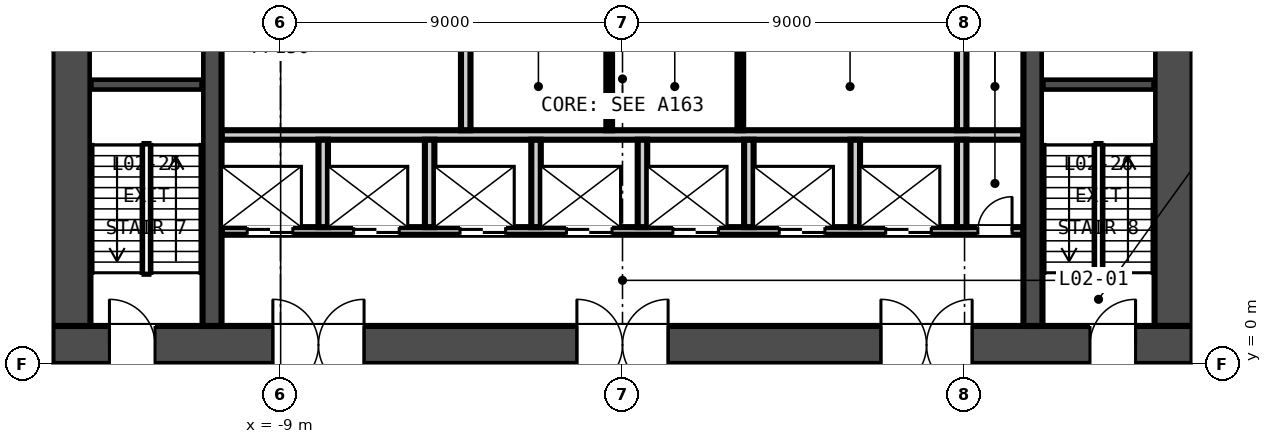
"""IFC4 building model, lengths in metres.
Left out: names, types, materials, properties, quantities, classifications, styles, units other than length and angle.
Written with IfcOpenShell. Run it as: python <this file> out.ifc"""

import sys

from ifc_helpers import new_model, si_unit, direction, frame, frame_2d, origin, place, context, subcontext, project, spatial, rectangle, extrude, element, fill, save


model = new_model("IFC4")
c1 = context("Model", 3, precision=1e-05, world=origin(), true_north=direction((0.0, 1.0)))
c2 = subcontext(c1, "Body", "Model", "MODEL_VIEW")
j1 = project(units=[si_unit("LENGTHUNIT", "METRE"), si_unit("PLANEANGLEUNIT", "RADIAN")], contexts=[c1])
p1 = place(None, origin())
s1 = spatial("IfcSite", under=j1, at=p1, CompositionType="ELEMENT")
p2 = place(p1, origin())
s2 = spatial("IfcBuilding", under=s1, at=p2, CompositionType="ELEMENT")
p3 = place(p2, frame((0.0, 0.0, 18.0)))
s3 = spatial("IfcBuildingStorey", under=s2, at=p3, CompositionType="ELEMENT", Elevation=18.0)
p4 = place(p3, frame((-15.0, 0.5, -0.4), z_axis=(0.0, 0.0, 1.0), x_axis=(1.0, 0.0, 0.0)))
e1 = element("IfcWall", 1, at=p4, inside=s3, PredefinedType="SOLIDWALL", context=c2, shape_type="SweptSolid", body=[
    extrude(rectangle(XDim=30.0, YDim=1.0, at=frame_2d((15.0, 0.0))), origin(), (0.0, 0.0, 1.0), 4.6),
])
p5 = place(p4, frame((5.8, 0.0, 0.4)))
e2 = element("IfcOpeningElement", 2, at=p5, cuts=e1, PredefinedType="OPENING", context=c2, shape_type="SweptSolid", body=[
    extrude(rectangle(XDim=2.4, YDim=2.4, at=frame_2d((1.2, 1.2))), frame((0.0, 0.51, 0.0), z_axis=(0.0, -1.0, 0.0), x_axis=(1.0, 0.0, 0.0)), (0.0, 0.0, 1.0), 1.02),
])
p6 = place(p4, frame((13.8, 0.0, 0.4)))
e3 = element("IfcOpeningElement", 3, at=p6, cuts=e1, PredefinedType="OPENING", context=c2, shape_type="SweptSolid", body=[
    extrude(rectangle(XDim=2.4, YDim=2.4, at=frame_2d((1.2, 1.2))), frame((0.0, 0.51, 0.0), z_axis=(0.0, -1.0, 0.0), x_axis=(1.0, 0.0, 0.0)), (0.0, 0.0, 1.0), 1.02),
])
p7 = place(p4, frame((21.8, 0.0, 0.4)))
e4 = element("IfcOpeningElement", 4, at=p7, cuts=e1, PredefinedType="OPENING", context=c2, shape_type="SweptSolid", body=[
    extrude(rectangle(XDim=2.4, YDim=2.4, at=frame_2d((1.2, 1.2))), frame((0.0, 0.51, 0.0), z_axis=(0.0, -1.0, 0.0), x_axis=(1.0, 0.0, 0.0)), (0.0, 0.0, 1.0), 1.02),
])
p8 = place(p4, frame((1.5, 0.0, 0.4)))
e5 = element("IfcOpeningElement", 5, at=p8, cuts=e1, PredefinedType="OPENING", context=c2, shape_type="SweptSolid", body=[
    extrude(rectangle(XDim=1.2, YDim=2.1, at=frame_2d((0.6, 1.05))), frame((0.0, 0.51, 0.0), z_axis=(0.0, -1.0, 0.0), x_axis=(1.0, 0.0, 0.0)), (0.0, 0.0, 1.0), 1.02),
])
p9 = place(p4, frame((27.3, 0.0, 0.4)))
e6 = element("IfcOpeningElement", 6, at=p9, cuts=e1, PredefinedType="OPENING", context=c2, shape_type="SweptSolid", body=[
    extrude(rectangle(XDim=1.2, YDim=2.1, at=frame_2d((0.6, 1.05))), frame((0.0, 0.51, 0.0), z_axis=(0.0, -1.0, 0.0), x_axis=(1.0, 0.0, 0.0)), (0.0, 0.0, 1.0), 1.02),
])
for number, where, z_axis, x_axis in (
    (7, (-14.5, 1.0, -0.4), (0.0, 0.0, 1.0), (0.0, 1.0, 0.0)),
    (8, (14.5, 1.0, -0.4), (0.0, 0.0, 1.0), (0.0, 1.0, 0.0)),
):
    element("IfcWall", number, at=place(p3, frame(where, z_axis=z_axis, x_axis=x_axis)), inside=s3, PredefinedType="SOLIDWALL", context=c2, shape_type="SweptSolid", body=[
        extrude(rectangle(XDim=13.0, YDim=1.0, at=frame_2d((6.5, 0.0))), origin(), (0.0, 0.0, 1.0), 4.6),
    ])
for number, where, z_axis, x_axis in (
    (9, (-10.8, 1.0, -0.4), (0.0, 0.0, 1.0), (0.0, 1.0, 0.0)),
    (10, (10.8, 1.0, -0.4), (0.0, 0.0, 1.0), (0.0, 1.0, 0.0)),
):
    element("IfcWall", number, at=place(p3, frame(where, z_axis=z_axis, x_axis=x_axis)), inside=s3, PredefinedType="SOLIDWALL", context=c2, shape_type="SweptSolid", body=[
        extrude(rectangle(XDim=13.0, YDim=0.5, at=frame_2d((6.5, 0.0))), origin(), (0.0, 0.0, 1.0), 4.6),
    ])
p10 = place(p3, frame((-10.55, 3.5, 0.0), z_axis=(0.0, 0.0, 1.0), x_axis=(1.0, 0.0, 0.0)))
e11 = element("IfcWall", 11, at=p10, inside=s3, PredefinedType="PARTITIONING", context=c2, shape_type="SweptSolid", body=[
    extrude(rectangle(XDim=21.1, YDim=0.2, at=frame_2d((10.55, 0.0))), origin(), (0.0, 0.0, 1.0), 4.2),
])
p11 = place(p10, frame((0.675, 0.0, 0.0)))
e12 = element("IfcOpeningElement", 12, at=p11, cuts=e11, PredefinedType="OPENING", context=c2, shape_type="SweptSolid", body=[
    extrude(rectangle(XDim=1.2, YDim=2.1, at=frame_2d((0.6, 1.05))), frame((0.0, 0.11, 0.0), z_axis=(0.0, -1.0, 0.0), x_axis=(1.0, 0.0, 0.0)), (0.0, 0.0, 1.0), 0.22),
])
p12 = place(p10, frame((3.475, 0.0, 0.0)))
e13 = element("IfcOpeningElement", 13, at=p12, cuts=e11, PredefinedType="OPENING", context=c2, shape_type="SweptSolid", body=[
    extrude(rectangle(XDim=1.2, YDim=2.1, at=frame_2d((0.6, 1.05))), frame((0.0, 0.11, 0.0), z_axis=(0.0, -1.0, 0.0), x_axis=(1.0, 0.0, 0.0)), (0.0, 0.0, 1.0), 0.22),
])
p13 = place(p10, frame((6.275, 0.0, 0.0)))
e14 = element("IfcOpeningElement", 14, at=p13, cuts=e11, PredefinedType="OPENING", context=c2, shape_type="SweptSolid", body=[
    extrude(rectangle(XDim=1.2, YDim=2.1, at=frame_2d((0.6, 1.05))), frame((0.0, 0.11, 0.0), z_axis=(0.0, -1.0, 0.0), x_axis=(1.0, 0.0, 0.0)), (0.0, 0.0, 1.0), 0.22),
])
p14 = place(p10, frame((9.075, 0.0, 0.0)))
e15 = element("IfcOpeningElement", 15, at=p14, cuts=e11, PredefinedType="OPENING", context=c2, shape_type="SweptSolid", body=[
    extrude(rectangle(XDim=1.2, YDim=2.1, at=frame_2d((0.6, 1.05))), frame((0.0, 0.11, 0.0), z_axis=(0.0, -1.0, 0.0), x_axis=(1.0, 0.0, 0.0)), (0.0, 0.0, 1.0), 0.22),
])
p15 = place(p10, frame((11.875, 0.0, 0.0)))
e16 = element("IfcOpeningElement", 16, at=p15, cuts=e11, PredefinedType="OPENING", context=c2, shape_type="SweptSolid", body=[
    extrude(rectangle(XDim=1.2, YDim=2.1, at=frame_2d((0.6, 1.05))), frame((0.0, 0.11, 0.0), z_axis=(0.0, -1.0, 0.0), x_axis=(1.0, 0.0, 0.0)), (0.0, 0.0, 1.0), 0.22),
])
p16 = place(p10, frame((14.675, 0.0, 0.0)))
e17 = element("IfcOpeningElement", 17, at=p16, cuts=e11, PredefinedType="OPENING", context=c2, shape_type="SweptSolid", body=[
    extrude(rectangle(XDim=1.2, YDim=2.1, at=frame_2d((0.6, 1.05))), frame((0.0, 0.11, 0.0), z_axis=(0.0, -1.0, 0.0), x_axis=(1.0, 0.0, 0.0)), (0.0, 0.0, 1.0), 0.22),
])
p17 = place(p10, frame((17.475, 0.0, 0.0)))
e18 = element("IfcOpeningElement", 18, at=p17, cuts=e11, PredefinedType="OPENING", context=c2, shape_type="SweptSolid", body=[
    extrude(rectangle(XDim=1.2, YDim=2.1, at=frame_2d((0.6, 1.05))), frame((0.0, 0.11, 0.0), z_axis=(0.0, -1.0, 0.0), x_axis=(1.0, 0.0, 0.0)), (0.0, 0.0, 1.0), 0.22),
])
p18 = place(p10, frame((19.9, 0.0, 0.0)))
e19 = element("IfcOpeningElement", 19, at=p18, cuts=e11, PredefinedType="OPENING", context=c2, shape_type="SweptSolid", body=[
    extrude(rectangle(XDim=0.9, YDim=2.1, at=frame_2d((0.45, 1.05))), frame((0.0, 0.11, 0.0), z_axis=(0.0, -1.0, 0.0), x_axis=(1.0, 0.0, 0.0)), (0.0, 0.0, 1.0), 0.22),
])
p19 = place(p3, frame((-10.55, 6.025, 0.0), z_axis=(0.0, 0.0, 1.0), x_axis=(1.0, 0.0, 0.0)))
e20 = element("IfcWall", 20, at=p19, inside=s3, PredefinedType="PARTITIONING", context=c2, shape_type="SweptSolid", body=[
    extrude(rectangle(XDim=21.1, YDim=0.25, at=frame_2d((10.55, 0.0))), origin(), (0.0, 0.0, 1.0), 4.2),
])
p20 = place(p3, frame((-4.125, 6.15, 0.0), z_axis=(0.0, 0.0, 1.0), x_axis=(0.0, 1.0, 0.0)))
e21 = element("IfcWall", 21, at=p20, inside=s3, PredefinedType="PARTITIONING", context=c2, shape_type="SweptSolid", body=[
    extrude(rectangle(XDim=4.95, YDim=0.25, at=frame_2d((2.475, 0.0))), origin(), (0.0, 0.0, 1.0), 4.2),
])
p21 = place(p20, frame((3.125, 0.0, 0.0)))
e22 = element("IfcOpeningElement", 22, at=p21, cuts=e21, PredefinedType="OPENING", context=c2, shape_type="SweptSolid", body=[
    extrude(rectangle(XDim=1.2, YDim=2.1, at=frame_2d((0.6, 1.05))), frame((0.0, 0.135, 0.0), z_axis=(0.0, -1.0, 0.0), x_axis=(1.0, 0.0, 0.0)), (0.0, 0.0, 1.0), 0.27),
])
for number, where, z_axis, x_axis in (
    (23, (-7.875, 3.6, 0.0), (0.0, 0.0, 1.0), (0.0, 1.0, 0.0)),
    (24, (-5.075, 3.6, 0.0), (0.0, 0.0, 1.0), (0.0, 1.0, 0.0)),
    (25, (-2.275, 3.6, 0.0), (0.0, 0.0, 1.0), (0.0, 1.0, 0.0)),
    (26, (0.525, 3.6, 0.0), (0.0, 0.0, 1.0), (0.0, 1.0, 0.0)),
    (27, (3.325, 3.6, 0.0), (0.0, 0.0, 1.0), (0.0, 1.0, 0.0)),
    (28, (6.125, 3.6, 0.0), (0.0, 0.0, 1.0), (0.0, 1.0, 0.0)),
    (29, (8.925, 3.6, 0.0), (0.0, 0.0, 1.0), (0.0, 1.0, 0.0)),
):
    element("IfcWall", number, at=place(p3, frame(where, z_axis=z_axis, x_axis=x_axis)), inside=s3, PredefinedType="PARTITIONING", context=c2, shape_type="SweptSolid", body=[
        extrude(rectangle(XDim=2.3, YDim=0.25, at=frame_2d((1.15, 0.0))), origin(), (0.0, 0.0, 1.0), 4.2),
    ])
for number, where, z_axis, x_axis in (
    (30, (-0.35, 6.15, 0.0), (0.0, 0.0, 1.0), (0.0, 1.0, 0.0)),
    (31, (3.1, 6.15, 0.0), (0.0, 0.0, 1.0), (0.0, 1.0, 0.0)),
):
    element("IfcWall", number, at=place(p3, frame(where, z_axis=z_axis, x_axis=x_axis)), inside=s3, PredefinedType="PARTITIONING", context=c2, shape_type="SweptSolid", body=[
        extrude(rectangle(XDim=2.3, YDim=0.15, at=frame_2d((1.15, 0.0))), origin(), (0.0, 0.0, 1.0), 4.2),
    ])
p22 = place(p3, frame((8.925, 6.15, 0.0), z_axis=(0.0, 0.0, 1.0), x_axis=(0.0, 1.0, 0.0)))
e32 = element("IfcWall", 32, at=p22, inside=s3, PredefinedType="PARTITIONING", context=c2, shape_type="SweptSolid", body=[
    extrude(rectangle(XDim=2.3, YDim=0.25, at=frame_2d((1.15, 0.0))), origin(), (0.0, 0.0, 1.0), 4.2),
])
for number, where, z_axis, x_axis in (
    (33, (-14.0, 7.35, -0.4), (0.0, 0.0, 1.0), (1.0, 0.0, 0.0)),
    (34, (11.05, 7.35, -0.4), (0.0, 0.0, 1.0), (1.0, 0.0, 0.0)),
):
    element("IfcWall", number, at=place(p3, frame(where, z_axis=z_axis, x_axis=x_axis)), inside=s3, PredefinedType="SOLIDWALL", context=c2, shape_type="SweptSolid", body=[
        extrude(rectangle(XDim=2.95, YDim=0.3, at=frame_2d((1.475, 0.0))), origin(), (0.0, 0.0, 1.0), 4.6),
    ])
p23 = place(p11, origin())
e35 = element("IfcDoor", 35, at=p23, inside=s3, OperationType="DOUBLE_DOOR_SLIDING", PredefinedType="DOOR", context=c2, shape_type="SweptSolid", body=[
    extrude(rectangle(XDim=1.2, YDim=2.1, at=frame_2d((0.6, 1.05))), frame((0.0, 0.025, 0.0), z_axis=(0.0, -1.0, 0.0), x_axis=(1.0, 0.0, 0.0)), (0.0, 0.0, 1.0), 0.05),
])
fill(e12, e35)
p24 = place(p12, origin())
e36 = element("IfcDoor", 36, at=p24, inside=s3, OperationType="DOUBLE_DOOR_SLIDING", PredefinedType="DOOR", context=c2, shape_type="SweptSolid", body=[
    extrude(rectangle(XDim=1.2, YDim=2.1, at=frame_2d((0.6, 1.05))), frame((0.0, 0.025, 0.0), z_axis=(0.0, -1.0, 0.0), x_axis=(1.0, 0.0, 0.0)), (0.0, 0.0, 1.0), 0.05),
])
fill(e13, e36)
p25 = place(p13, origin())
e37 = element("IfcDoor", 37, at=p25, inside=s3, OperationType="DOUBLE_DOOR_SLIDING", PredefinedType="DOOR", context=c2, shape_type="SweptSolid", body=[
    extrude(rectangle(XDim=1.2, YDim=2.1, at=frame_2d((0.6, 1.05))), frame((0.0, 0.025, 0.0), z_axis=(0.0, -1.0, 0.0), x_axis=(1.0, 0.0, 0.0)), (0.0, 0.0, 1.0), 0.05),
])
fill(e14, e37)
p26 = place(p14, origin())
e38 = element("IfcDoor", 38, at=p26, inside=s3, OperationType="DOUBLE_DOOR_SLIDING", PredefinedType="DOOR", context=c2, shape_type="SweptSolid", body=[
    extrude(rectangle(XDim=1.2, YDim=2.1, at=frame_2d((0.6, 1.05))), frame((0.0, 0.025, 0.0), z_axis=(0.0, -1.0, 0.0), x_axis=(1.0, 0.0, 0.0)), (0.0, 0.0, 1.0), 0.05),
])
fill(e15, e38)
p27 = place(p15, origin())
e39 = element("IfcDoor", 39, at=p27, inside=s3, OperationType="DOUBLE_DOOR_SLIDING", PredefinedType="DOOR", context=c2, shape_type="SweptSolid", body=[
    extrude(rectangle(XDim=1.2, YDim=2.1, at=frame_2d((0.6, 1.05))), frame((0.0, 0.025, 0.0), z_axis=(0.0, -1.0, 0.0), x_axis=(1.0, 0.0, 0.0)), (0.0, 0.0, 1.0), 0.05),
])
fill(e16, e39)
p28 = place(p16, origin())
e40 = element("IfcDoor", 40, at=p28, inside=s3, OperationType="DOUBLE_DOOR_SLIDING", PredefinedType="DOOR", context=c2, shape_type="SweptSolid", body=[
    extrude(rectangle(XDim=1.2, YDim=2.1, at=frame_2d((0.6, 1.05))), frame((0.0, 0.025, 0.0), z_axis=(0.0, -1.0, 0.0), x_axis=(1.0, 0.0, 0.0)), (0.0, 0.0, 1.0), 0.05),
])
fill(e17, e40)
p29 = place(p17, origin())
e41 = element("IfcDoor", 41, at=p29, inside=s3, OperationType="DOUBLE_DOOR_SLIDING", PredefinedType="DOOR", context=c2, shape_type="SweptSolid", body=[
    extrude(rectangle(XDim=1.2, YDim=2.1, at=frame_2d((0.6, 1.05))), frame((0.0, 0.025, 0.0), z_axis=(0.0, -1.0, 0.0), x_axis=(1.0, 0.0, 0.0)), (0.0, 0.0, 1.0), 0.05),
])
fill(e18, e41)
p30 = place(p18, origin())
e42 = element("IfcDoor", 42, at=p30, inside=s3, OperationType="SINGLE_SWING_RIGHT", PredefinedType="DOOR", context=c2, shape_type="SweptSolid", body=[
    extrude(rectangle(XDim=0.9, YDim=2.1, at=frame_2d((0.45, 1.05))), frame((0.0, 0.025, 0.0), z_axis=(0.0, -1.0, 0.0), x_axis=(1.0, 0.0, 0.0)), (0.0, 0.0, 1.0), 0.05),
])
fill(e19, e42)
p31 = place(p5, origin())
e43 = element("IfcDoor", 43, at=p31, inside=s3, OperationType="DOUBLE_DOOR_DOUBLE_SWING", PredefinedType="DOOR", context=c2, shape_type="SweptSolid", body=[
    extrude(rectangle(XDim=2.4, YDim=2.4, at=frame_2d((1.2, 1.2))), frame((0.0, 0.025, 0.0), z_axis=(0.0, -1.0, 0.0), x_axis=(1.0, 0.0, 0.0)), (0.0, 0.0, 1.0), 0.05),
])
fill(e2, e43)
p32 = place(p6, origin())
e44 = element("IfcDoor", 44, at=p32, inside=s3, OperationType="DOUBLE_DOOR_DOUBLE_SWING", PredefinedType="DOOR", context=c2, shape_type="SweptSolid", body=[
    extrude(rectangle(XDim=2.4, YDim=2.4, at=frame_2d((1.2, 1.2))), frame((0.0, 0.025, 0.0), z_axis=(0.0, -1.0, 0.0), x_axis=(1.0, 0.0, 0.0)), (0.0, 0.0, 1.0), 0.05),
])
fill(e3, e44)
p33 = place(p7, origin())
e45 = element("IfcDoor", 45, at=p33, inside=s3, OperationType="DOUBLE_DOOR_DOUBLE_SWING", PredefinedType="DOOR", context=c2, shape_type="SweptSolid", body=[
    extrude(rectangle(XDim=2.4, YDim=2.4, at=frame_2d((1.2, 1.2))), frame((0.0, 0.025, 0.0), z_axis=(0.0, -1.0, 0.0), x_axis=(1.0, 0.0, 0.0)), (0.0, 0.0, 1.0), 0.05),
])
fill(e4, e45)
p34 = place(p8, origin())
e46 = element("IfcDoor", 46, at=p34, inside=s3, OperationType="SINGLE_SWING_LEFT", PredefinedType="DOOR", context=c2, shape_type="SweptSolid", body=[
    extrude(rectangle(XDim=1.2, YDim=2.1, at=frame_2d((0.6, 1.05))), frame((0.0, 0.025, 0.0), z_axis=(0.0, -1.0, 0.0), x_axis=(1.0, 0.0, 0.0)), (0.0, 0.0, 1.0), 0.05),
])
fill(e5, e46)
p35 = place(p9, origin())
e47 = element("IfcDoor", 47, at=p35, inside=s3, OperationType="SINGLE_SWING_RIGHT", PredefinedType="DOOR", context=c2, shape_type="SweptSolid", body=[
    extrude(rectangle(XDim=1.2, YDim=2.1, at=frame_2d((0.6, 1.05))), frame((0.0, 0.025, 0.0), z_axis=(0.0, -1.0, 0.0), x_axis=(1.0, 0.0, 0.0)), (0.0, 0.0, 1.0), 0.05),
])
fill(e6, e47)
save(model, sys.argv[1])
